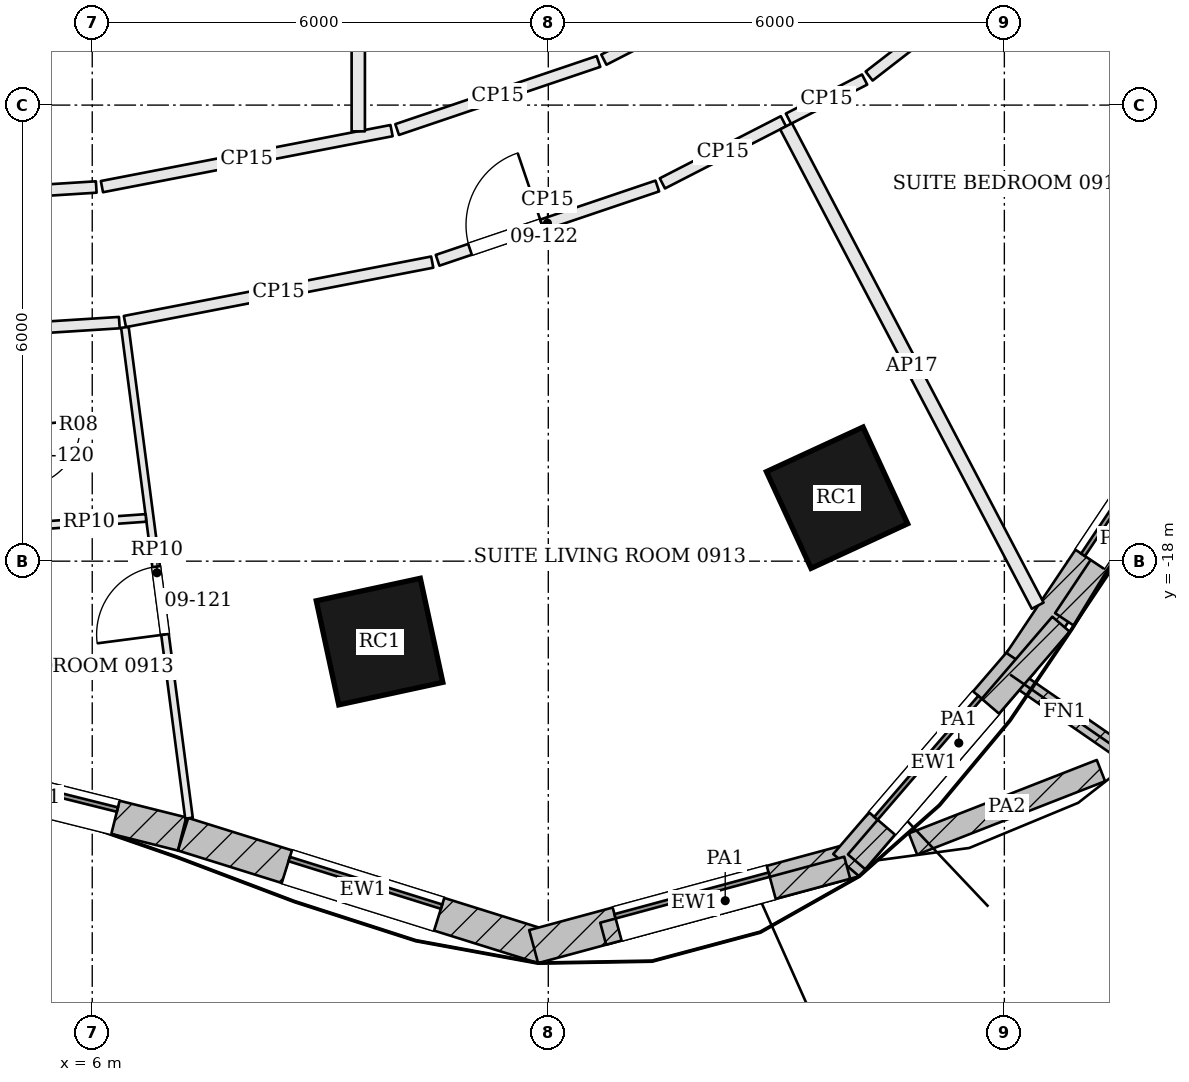
"""IFC4 building model, lengths in metres.
Left out: names, types, materials, properties, quantities, classifications, styles, units other than length and angle.
Written with IfcOpenShell. Run it as: python <this file> out.ifc"""

import sys

from ifc_helpers import new_model, si_unit, direction, frame, frame_2d, origin, origin_2d, place, context, subcontext, project, spatial, rectangle, extrude, element, fill, save


model = new_model("IFC4")
c1 = context("Model", 3, precision=1e-05, world=origin(), true_north=direction((0.0, 1.0)))
c2 = subcontext(c1, "Body", "Model", "MODEL_VIEW")
j1 = project(units=[si_unit("LENGTHUNIT", "METRE"), si_unit("PLANEANGLEUNIT", "RADIAN")], contexts=[c1])
p1 = place(None, origin())
s1 = spatial("IfcSite", under=j1, at=p1, CompositionType="ELEMENT")
p2 = place(p1, origin())
s2 = spatial("IfcBuilding", under=s1, at=p2, CompositionType="ELEMENT")
p3 = place(p2, frame((0.0, 0.0, 48.3)))
s3 = spatial("IfcBuildingStorey", under=s2, at=p3, CompositionType="ELEMENT", Elevation=48.3)
for number, where, z_axis, x_axis in (
    (1, (9.78, -19.058, 0.0), (0.0, 0.0, 1.0), (0.977, 0.211, 0.0)),
    (2, (15.799, -17.165, 0.0), (0.0, 0.0, 1.0), (0.908, 0.419, 0.0)),
):
    element("IfcColumn", number, at=place(p3, frame(where, z_axis=z_axis, x_axis=x_axis)), inside=s3, PredefinedType="COLUMN", context=c2, shape_type="SweptSolid", body=[
        extrude(rectangle(XDim=1.4, YDim=1.4, at=origin_2d()), origin(), (0.0, 0.0, 1.0), 3.6),
    ])
p4 = place(p3, frame((3.392, -20.642, 0.0), z_axis=(0.0, 0.0, 1.0), x_axis=(0.970168229467, -0.242432684539, 0.0)))
e3 = element("IfcWall", 3, at=p4, inside=s3, PredefinedType="SOLIDWALL", context=c2, shape_type="SweptSolid", body=[
    extrude(rectangle(XDim=3.906, YDim=0.45, at=frame_2d((1.953, 0.0))), origin(), (0.0, 0.0, 1.0), 3.4),
])
p5 = place(p4, frame((0.903, 0.0, 0.9)))
e4 = element("IfcOpeningElement", 4, at=p5, cuts=e3, PredefinedType="OPENING", context=c2, shape_type="SweptSolid", body=[
    extrude(rectangle(XDim=2.1, YDim=2.0, at=frame_2d((1.05, 1.0))), frame((0.0, 0.235, 0.0), z_axis=(0.0, -1.0, 0.0), x_axis=(1.0, 0.0, 0.0)), (0.0, 0.0, 1.0), 0.47),
])
p6 = place(p3, frame((7.196, -21.593, 0.0), z_axis=(0.0, 0.0, 1.0), x_axis=(0.954471218741, -0.298303021432, 0.0)))
e5 = element("IfcWall", 5, at=p6, inside=s3, PredefinedType="SOLIDWALL", context=c2, shape_type="SweptSolid", body=[
    extrude(rectangle(XDim=4.96, YDim=0.45, at=frame_2d((2.48, 0.0))), origin(), (0.0, 0.0, 1.0), 3.4),
])
p7 = place(p6, frame((1.43, 0.0, 0.9)))
e6 = element("IfcOpeningElement", 6, at=p7, cuts=e5, PredefinedType="OPENING", context=c2, shape_type="SweptSolid", body=[
    extrude(rectangle(XDim=2.1, YDim=2.0, at=frame_2d((1.05, 1.0))), frame((0.0, 0.235, 0.0), z_axis=(0.0, -1.0, 0.0), x_axis=(1.0, 0.0, 0.0)), (0.0, 0.0, 1.0), 0.47),
])
p8 = place(p3, frame((11.807, -23.071, 0.0), z_axis=(0.0, 0.0, 1.0), x_axis=(0.965334520334, 0.261015830653, 0.0)))
e7 = element("IfcWall", 7, at=p8, inside=s3, PredefinedType="SOLIDWALL", context=c2, shape_type="SweptSolid", body=[
    extrude(rectangle(XDim=4.375, YDim=0.45, at=frame_2d((2.188, 0.0))), origin(), (0.0, 0.0, 1.0), 3.4),
])
p9 = place(p8, frame((1.138, 0.0, 0.9)))
e8 = element("IfcOpeningElement", 8, at=p9, cuts=e7, PredefinedType="OPENING", context=c2, shape_type="SweptSolid", body=[
    extrude(rectangle(XDim=2.1, YDim=2.0, at=frame_2d((1.05, 1.0))), frame((0.0, 0.235, 0.0), z_axis=(0.0, -1.0, 0.0), x_axis=(1.0, 0.0, 0.0)), (0.0, 0.0, 1.0), 0.47),
])
p10 = place(p3, frame((15.919, -21.999, 0.0), z_axis=(0.0, 0.0, 1.0), x_axis=(0.652009971272, 0.758210391225, 0.0)))
e9 = element("IfcWall", 9, at=p10, inside=s3, PredefinedType="SOLIDWALL", context=c2, shape_type="SweptSolid", body=[
    extrude(rectangle(XDim=3.545, YDim=0.45, at=frame_2d((1.772, 0.0))), origin(), (0.0, 0.0, 1.0), 3.4),
])
p11 = place(p10, frame((0.722, 0.0, 0.9)))
e10 = element("IfcOpeningElement", 10, at=p11, cuts=e9, PredefinedType="OPENING", context=c2, shape_type="SweptSolid", body=[
    extrude(rectangle(XDim=2.1, YDim=2.0, at=frame_2d((1.05, 1.0))), frame((0.0, 0.235, 0.0), z_axis=(0.0, -1.0, 0.0), x_axis=(1.0, 0.0, 0.0)), (0.0, 0.0, 1.0), 0.47),
])
p12 = place(p3, frame((18.214, -19.333, 0.0), z_axis=(0.0, 0.0, 1.0), x_axis=(0.555833135316, 0.831293886471, 0.0)))
e11 = element("IfcWall", 11, at=p12, inside=s3, PredefinedType="SOLIDWALL", context=c2, shape_type="SweptSolid", body=[
    extrude(rectangle(XDim=5.368, YDim=0.45, at=frame_2d((2.684, 0.0))), origin(), (0.0, 0.0, 1.0), 3.4),
])
p13 = place(p12, frame((1.634, 0.0, 0.9)))
e12 = element("IfcOpeningElement", 12, at=p13, cuts=e11, PredefinedType="OPENING", context=c2, shape_type="SweptSolid", body=[
    extrude(rectangle(XDim=2.1, YDim=2.0, at=frame_2d((1.05, 1.0))), frame((0.0, 0.235, 0.0), z_axis=(0.0, -1.0, 0.0), x_axis=(1.0, 0.0, 0.0)), (0.0, 0.0, 1.0), 0.47),
])
p14 = place(p3, frame((18.076, -19.492, 0.0), z_axis=(0.0, 0.0, 1.0), x_axis=(0.822618823872, -0.568593238274, 0.0)))
e13 = element("IfcWall", 13, at=p14, inside=s3, PredefinedType="SOLIDWALL", context=c2, shape_type="SweptSolid", body=[
    extrude(rectangle(XDim=1.75, YDim=0.2, at=frame_2d((0.875, 0.0))), origin(), (0.0, 0.0, 1.0), 3.4),
])
p15 = place(p3, frame((19.271, -20.755, 0.0), z_axis=(0.0, 0.0, 1.0), x_axis=(-0.931465141624, -0.36383057862, 0.0)))
e14 = element("IfcWall", 14, at=p15, inside=s3, PredefinedType="PARAPET", context=c2, shape_type="SweptSolid", body=[
    extrude(rectangle(XDim=2.655, YDim=0.3, at=frame_2d((1.327, 0.0))), origin(), (0.0, 0.0, 1.0), 1.1),
])
p16 = place(p3, frame((12.722, -22.901, 3.6), z_axis=(0.0, 0.0, 1.0), x_axis=(0.96534590031, 0.260973739589, 0.0)))
e15 = element("IfcWall", 15, at=p16, inside=s3, PredefinedType="PARAPET", context=c2, shape_type="SweptSolid", body=[
    extrude(rectangle(XDim=3.326, YDim=0.3, at=frame_2d((1.663, 0.0))), origin(), (0.0, 0.0, 1.0), 1.1),
])
p17 = place(p3, frame((16.056, -21.956, 3.6), z_axis=(0.0, 0.0, 1.0), x_axis=(0.652038588201, 0.75818578165, 0.0)))
e16 = element("IfcWall", 16, at=p17, inside=s3, PredefinedType="PARAPET", context=c2, shape_type="SweptSolid", body=[
    extrude(rectangle(XDim=4.124, YDim=0.3, at=frame_2d((2.062, 0.0))), origin(), (0.0, 0.0, 1.0), 1.1),
])
p18 = place(p3, frame((18.792, -18.767, 3.6), z_axis=(0.0, 0.0, 1.0), x_axis=(0.555843382853, 0.831287034507, 0.0)))
e17 = element("IfcWall", 17, at=p18, inside=s3, PredefinedType="PARAPET", context=c2, shape_type="SweptSolid", body=[
    extrude(rectangle(XDim=2.562, YDim=0.3, at=frame_2d((1.281, 0.0))), origin(), (0.0, 0.0, 1.0), 1.1),
])
p19 = place(p3, frame((3.028, -15.073, 0.0), z_axis=(0.0, 0.0, 1.0), x_axis=(0.997992583289, 0.063330906356, 0.0)))
e18 = element("IfcWall", 18, at=p19, inside=s3, PredefinedType="PARTITIONING", context=c2, shape_type="SweptSolid", body=[
    extrude(rectangle(XDim=3.334, YDim=0.15, at=frame_2d((1.667, 0.0))), origin(), (0.0, 0.0, 1.0), 2.68),
])
p20 = place(p3, frame((6.43, -14.848, 0.0), z_axis=(0.0, 0.0, 1.0), x_axis=(0.981801609996, 0.189909448446, 0.0)))
e19 = element("IfcWall", 19, at=p20, inside=s3, PredefinedType="PARTITIONING", context=c2, shape_type="SweptSolid", body=[
    extrude(rectangle(XDim=4.118, YDim=0.15, at=frame_2d((2.059, 0.0))), origin(), (0.0, 0.0, 1.0), 2.68),
])
p21 = place(p3, frame((10.544, -14.042, 0.0), z_axis=(0.0, 0.0, 1.0), x_axis=(0.947314242069, 0.320305677085, 0.0)))
e20 = element("IfcWall", 20, at=p21, inside=s3, PredefinedType="PARTITIONING", context=c2, shape_type="SweptSolid", body=[
    extrude(rectangle(XDim=3.051, YDim=0.15, at=frame_2d((1.525, 0.0))), origin(), (0.0, 0.0, 1.0), 2.68),
])
p22 = place(p21, frame((0.45, 0.0, 0.0)))
e21 = element("IfcOpeningElement", 21, at=p22, cuts=e20, PredefinedType="OPENING", context=c2, shape_type="SweptSolid", body=[
    extrude(rectangle(XDim=1.0, YDim=2.1, at=frame_2d((0.5, 1.05))), frame((0.0, 0.085, 0.0), z_axis=(0.0, -1.0, 0.0), x_axis=(1.0, 0.0, 0.0)), (0.0, 0.0, 1.0), 0.17),
])
p23 = place(p3, frame((13.501, -13.03, 0.0), z_axis=(0.0, 0.0, 1.0), x_axis=(0.88960147572, 0.456737577168, 0.0)))
e22 = element("IfcWall", 22, at=p23, inside=s3, PredefinedType="PARTITIONING", context=c2, shape_type="SweptSolid", body=[
    extrude(rectangle(XDim=1.79, YDim=0.15, at=frame_2d((0.895, 0.0))), origin(), (0.0, 0.0, 1.0), 2.68),
])
p24 = place(p3, frame((18.439, -18.586, 0.0), z_axis=(0.0, 0.0, 1.0), x_axis=(-0.464812403085, 0.885409187855, 0.0)))
e23 = element("IfcWall", 23, at=p24, inside=s3, PredefinedType="PARTITIONING", context=c2, shape_type="SweptSolid", body=[
    extrude(rectangle(XDim=7.123, YDim=0.175, at=frame_2d((3.562, 0.0))), origin(), (0.0, 0.0, 1.0), 2.68),
])
p25 = place(p3, frame((15.16, -12.178, 0.0), z_axis=(0.0, 0.0, 1.0), x_axis=(0.889562255844, 0.456813958826, 0.0)))
e24 = element("IfcWall", 24, at=p25, inside=s3, PredefinedType="PARTITIONING", context=c2, shape_type="SweptSolid", body=[
    extrude(rectangle(XDim=1.126, YDim=0.15, at=frame_2d((0.563, 0.0))), origin(), (0.0, 0.0, 1.0), 2.68),
])
p26 = place(p3, frame((16.221, -11.618, 0.0), z_axis=(0.0, 0.0, 1.0), x_axis=(0.79075977513, 0.612126602948, 0.0)))
e25 = element("IfcWall", 25, at=p26, inside=s3, PredefinedType="PARTITIONING", context=c2, shape_type="SweptSolid", body=[
    extrude(rectangle(XDim=2.854, YDim=0.15, at=frame_2d((1.427, 0.0))), origin(), (0.0, 0.0, 1.0), 2.68),
])
p27 = place(p3, frame((15.125, -10.173, 0.0), z_axis=(0.0, 0.0, 1.0), x_axis=(-0.889567018144, -0.456804684993, 0.0)))
e26 = element("IfcWall", 26, at=p27, inside=s3, PredefinedType="PARTITIONING", context=c2, shape_type="SweptSolid", body=[
    extrude(rectangle(XDim=2.691, YDim=0.15, at=frame_2d((1.345, 0.0))), origin(), (0.0, 0.0, 1.0), 2.68),
])
p28 = place(p3, frame((12.66, -11.426, 0.0), z_axis=(0.0, 0.0, 1.0), x_axis=(-0.94731220982, -0.320311687465, 0.0)))
e27 = element("IfcWall", 27, at=p28, inside=s3, PredefinedType="PARTITIONING", context=c2, shape_type="SweptSolid", body=[
    extrude(rectangle(XDim=2.796, YDim=0.15, at=frame_2d((1.398, 0.0))), origin(), (0.0, 0.0, 1.0), 2.68),
])
p29 = place(p3, frame((9.938, -12.336, 0.0), z_axis=(0.0, 0.0, 1.0), x_axis=(-0.981799909949, -0.18991823721, 0.0)))
e28 = element("IfcWall", 28, at=p29, inside=s3, PredefinedType="PARTITIONING", context=c2, shape_type="SweptSolid", body=[
    extrude(rectangle(XDim=3.881, YDim=0.15, at=frame_2d((1.94, 0.0))), origin(), (0.0, 0.0, 1.0), 2.68),
])
p30 = place(p3, frame((6.053, -13.077, 0.0), z_axis=(0.0, 0.0, 1.0), x_axis=(-0.997994823425, -0.06329559556, 0.0)))
e29 = element("IfcWall", 29, at=p30, inside=s3, PredefinedType="PARTITIONING", context=c2, shape_type="SweptSolid", body=[
    extrude(rectangle(XDim=4.987, YDim=0.15, at=frame_2d((2.494, 0.0))), origin(), (0.0, 0.0, 1.0), 2.68),
])
p31 = place(p3, frame((7.273, -21.381, 0.0), z_axis=(0.0, 0.0, 1.0), x_axis=(-0.129491443272, 0.991580539401, 0.0)))
e30 = element("IfcWall", 30, at=p31, inside=s3, PredefinedType="PARTITIONING", context=c2, shape_type="SweptSolid", body=[
    extrude(rectangle(XDim=6.512, YDim=0.1, at=frame_2d((3.256, 0.0))), origin(), (0.0, 0.0, 1.0), 2.934),
])
p32 = place(p31, frame((2.437, 0.0, 0.0)))
e31 = element("IfcOpeningElement", 31, at=p32, cuts=e30, PredefinedType="OPENING", context=c2, shape_type="SweptSolid", body=[
    extrude(rectangle(XDim=0.9, YDim=2.4, at=frame_2d((0.45, 1.2))), frame((0.0, 0.06, 0.0), z_axis=(0.0, -1.0, 0.0), x_axis=(1.0, 0.0, 0.0)), (0.0, 0.0, 1.0), 0.12),
])
p33 = place(p3, frame((5.213, -17.538, 0.0), z_axis=(0.0, 0.0, 1.0), x_axis=(0.997447931568, 0.071397645698, 0.0)))
e32 = element("IfcWall", 32, at=p33, inside=s3, PredefinedType="PARTITIONING", context=c2, shape_type="SweptSolid", body=[
    extrude(rectangle(XDim=1.498, YDim=0.1, at=frame_2d((0.749, 0.0))), origin(), (0.0, 0.0, 1.0), 2.934),
])
p34 = place(p3, frame((18.759, -9.648, 0.0), z_axis=(0.0, 0.0, 1.0), x_axis=(0.731331715945, -0.682021936049, 0.0)))
e33 = element("IfcWall", 33, at=p34, inside=s3, PredefinedType="PARTITIONING", context=c2, shape_type="SweptSolid", body=[
    extrude(rectangle(XDim=2.525, YDim=0.1, at=frame_2d((1.263, 0.0))), origin(), (0.0, 0.0, 1.0), 2.934),
])
p35 = place(p34, frame((1.2, 0.0, 0.0)))
e34 = element("IfcOpeningElement", 34, at=p35, cuts=e33, PredefinedType="OPENING", context=c2, shape_type="SweptSolid", body=[
    extrude(rectangle(XDim=0.8, YDim=2.1, at=frame_2d((0.4, 1.05))), frame((0.0, 0.06, 0.0), z_axis=(0.0, -1.0, 0.0), x_axis=(1.0, 0.0, 0.0)), (0.0, 0.0, 1.0), 0.12),
])
p36 = place(p3, frame((9.5, -12.345, 0.0), z_axis=(0.0, 0.0, 1.0), x_axis=(0.0, 1.0, 0.0)))
e35 = element("IfcWall", 35, at=p36, inside=s3, PredefinedType="PARTITIONING", context=c2, shape_type="SweptSolid", body=[
    extrude(rectangle(XDim=7.47, YDim=0.175, at=frame_2d((3.735, 0.0))), origin(), (0.0, 0.0, 1.0), 2.68),
])
p37 = place(p5, origin())
e36 = element("IfcWindow", 36, at=p37, inside=s3, PartitioningType="SINGLE_PANEL", PredefinedType="WINDOW", context=c2, shape_type="SweptSolid", body=[
    extrude(rectangle(XDim=2.1, YDim=2.0, at=frame_2d((1.05, 1.0))), frame((0.0, 0.135, 0.0), z_axis=(0.0, -1.0, 0.0), x_axis=(1.0, 0.0, 0.0)), (0.0, 0.0, 1.0), 0.06),
])
fill(e4, e36)
p38 = place(p7, origin())
e37 = element("IfcWindow", 37, at=p38, inside=s3, PartitioningType="SINGLE_PANEL", PredefinedType="WINDOW", context=c2, shape_type="SweptSolid", body=[
    extrude(rectangle(XDim=2.1, YDim=2.0, at=frame_2d((1.05, 1.0))), frame((0.0, 0.135, 0.0), z_axis=(0.0, -1.0, 0.0), x_axis=(1.0, 0.0, 0.0)), (0.0, 0.0, 1.0), 0.06),
])
fill(e6, e37)
p39 = place(p9, origin())
e38 = element("IfcWindow", 38, at=p39, inside=s3, PartitioningType="SINGLE_PANEL", PredefinedType="WINDOW", context=c2, shape_type="SweptSolid", body=[
    extrude(rectangle(XDim=2.1, YDim=2.0, at=frame_2d((1.05, 1.0))), frame((0.0, 0.135, 0.0), z_axis=(0.0, -1.0, 0.0), x_axis=(1.0, 0.0, 0.0)), (0.0, 0.0, 1.0), 0.06),
])
fill(e8, e38)
p40 = place(p11, origin())
e39 = element("IfcWindow", 39, at=p40, inside=s3, PartitioningType="SINGLE_PANEL", PredefinedType="WINDOW", context=c2, shape_type="SweptSolid", body=[
    extrude(rectangle(XDim=2.1, YDim=2.0, at=frame_2d((1.05, 1.0))), frame((0.0, 0.135, 0.0), z_axis=(0.0, -1.0, 0.0), x_axis=(1.0, 0.0, 0.0)), (0.0, 0.0, 1.0), 0.06),
])
fill(e10, e39)
p41 = place(p13, origin())
e40 = element("IfcWindow", 40, at=p41, inside=s3, PartitioningType="SINGLE_PANEL", PredefinedType="WINDOW", context=c2, shape_type="SweptSolid", body=[
    extrude(rectangle(XDim=2.1, YDim=2.0, at=frame_2d((1.05, 1.0))), frame((0.0, 0.135, 0.0), z_axis=(0.0, -1.0, 0.0), x_axis=(1.0, 0.0, 0.0)), (0.0, 0.0, 1.0), 0.06),
])
fill(e12, e40)
p42 = place(p32, origin())
e41 = element("IfcDoor", 41, at=p42, inside=s3, OperationType="SINGLE_SWING_LEFT", PredefinedType="DOOR", context=c2, shape_type="SweptSolid", body=[
    extrude(rectangle(XDim=0.9, YDim=2.4, at=frame_2d((0.45, 1.2))), frame((0.0, 0.025, 0.0), z_axis=(0.0, -1.0, 0.0), x_axis=(1.0, 0.0, 0.0)), (0.0, 0.0, 1.0), 0.05),
])
fill(e31, e41)
p43 = place(p22, origin())
e42 = element("IfcDoor", 42, at=p43, inside=s3, OperationType="SINGLE_SWING_RIGHT", PredefinedType="DOOR", context=c2, shape_type="SweptSolid", body=[
    extrude(rectangle(XDim=1.0, YDim=2.1, at=frame_2d((0.5, 1.05))), frame((0.0, 0.025, 0.0), z_axis=(0.0, -1.0, 0.0), x_axis=(1.0, 0.0, 0.0)), (0.0, 0.0, 1.0), 0.05),
])
fill(e21, e42)
save(model, sys.argv[1])
